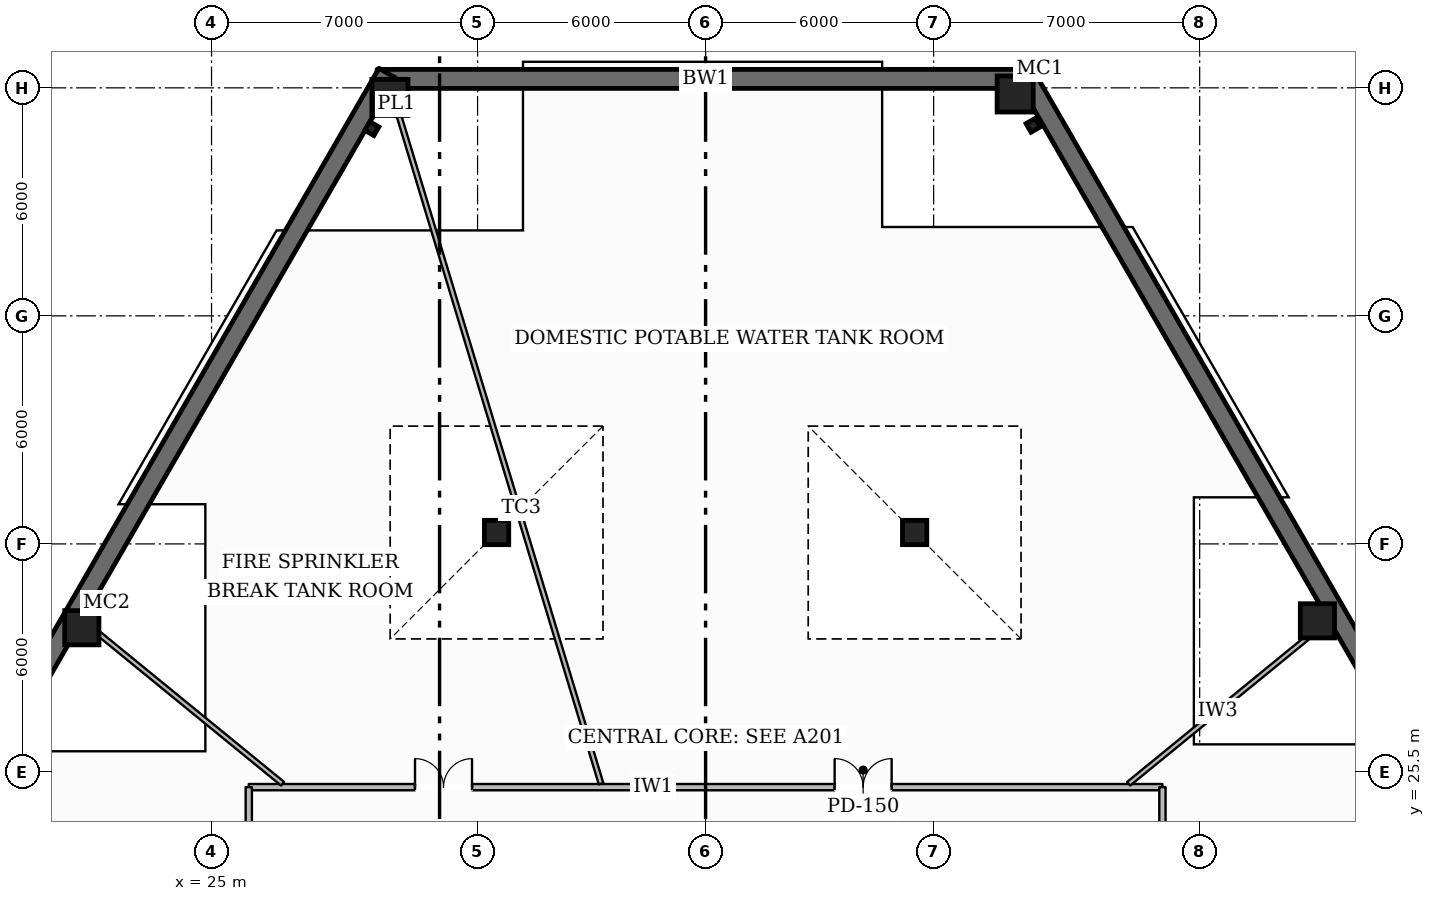
"""IFC4 building model, lengths in metres.
Left out: names, types, materials, properties, quantities, classifications, styles, units other than length and angle.
Written with IfcOpenShell. Run it as: python <this file> out.ifc"""

import sys

from ifc_helpers import new_model, si_unit, direction, frame, frame_2d, origin, origin_2d, place, context, subcontext, project, spatial, rectangle, hollow_rectangle, i_section, extrude, element, fill, save


model = new_model("IFC4")
c1 = context("Model", 3, precision=1e-05, world=origin(), true_north=direction((0.0, 1.0)))
c2 = subcontext(c1, "Body", "Model", "MODEL_VIEW")
j1 = project(units=[si_unit("LENGTHUNIT", "METRE"), si_unit("PLANEANGLEUNIT", "RADIAN")], contexts=[c1])
p1 = place(None, origin())
s1 = spatial("IfcSite", under=j1, at=p1, CompositionType="ELEMENT")
p2 = place(p1, origin())
s2 = spatial("IfcBuilding", under=s1, at=p2, CompositionType="ELEMENT")
p3 = place(p2, frame((0.0, 0.0, -8.4)))
s3 = spatial("IfcBuildingStorey", under=s2, at=p3, CompositionType="ELEMENT", Elevation=-8.4)
p4 = place(p3, frame((46.644, 43.736, 0.0), z_axis=(0.0, 0.0, 1.0), x_axis=(-1.0, 0.0, 0.0)))
e1 = element("IfcWall", 1, at=p4, inside=s3, PredefinedType="SHEAR", context=c2, shape_type="SweptSolid", body=[
    extrude(rectangle(XDim=17.289, YDim=0.5, at=frame_2d((8.644, 0.0))), origin(), (0.0, 0.0, 1.0), 3.95),
])
for number, where, z_axis, x_axis in (
    (2, (29.622, 43.889, 0.0), (0.0, 0.0, 1.0), (-0.5, -0.866, 0.0)),
    (3, (62.878, 15.311, 0.0), (0.0, 0.0, 1.0), (-0.5, 0.866, 0.0)),
):
    element("IfcWall", number, at=place(p3, frame(where, z_axis=z_axis, x_axis=x_axis)), inside=s3, PredefinedType="SHEAR", context=c2, shape_type="SweptSolid", body=[
        extrude(rectangle(XDim=33.0, YDim=0.5, at=frame_2d((16.5, 0.0))), origin(), (0.0, 0.0, 1.0), 3.95),
    ])
for number, where, z_axis, x_axis in (
    (4, (46.145, 43.339, 0.0), (0.0, 0.0, 1.0), (1.0, 0.0, 0.0)),
    (5, (29.695, 43.249, 0.0), (0.0, 0.0, 1.0), (1.0, 0.0, 0.0)),
):
    element("IfcColumn", number, at=place(p3, frame(where, z_axis=z_axis, x_axis=x_axis)), inside=s3, PredefinedType="COLUMN", context=c2, shape_type="SweptSolid", body=[
        extrude(hollow_rectangle(XDim=0.95, YDim=0.95, WallThickness=0.04, at=origin_2d()), origin(), (0.0, 0.0, 1.0), 3.95),
    ])
for number, where, z_axis, x_axis in (
    (6, (21.587, 29.294, 0.0), (0.0, 0.0, 1.0), (1.0, 0.0, 0.0)),
    (7, (54.098, 29.476, 0.0), (0.0, 0.0, 1.0), (1.0, 0.0, 0.0)),
):
    element("IfcColumn", number, at=place(p3, frame(where, z_axis=z_axis, x_axis=x_axis)), inside=s3, PredefinedType="COLUMN", context=c2, shape_type="SweptSolid", body=[
        extrude(hollow_rectangle(XDim=0.9, YDim=0.9, WallThickness=0.038, at=origin_2d()), origin(), (0.0, 0.0, 1.0), 3.95),
    ])
for number, where, z_axis, x_axis in (
    (8, (29.217, 42.427, 0.0), (0.0, 0.0, 1.0), (-0.502, -0.865, 0.0)),
    (9, (46.617, 42.515, 0.0), (0.0, 0.0, 1.0), (-0.498, 0.867, 0.0)),
):
    element("IfcColumn", number, at=place(p3, frame(where, z_axis=z_axis, x_axis=x_axis)), inside=s3, PredefinedType="PILASTER", context=c2, shape_type="SweptSolid", body=[
        extrude(i_section(OverallWidth=0.261, OverallDepth=0.276, WebThickness=0.015, FlangeThickness=0.025, at=origin_2d()), origin(), (0.0, 0.0, 1.0), 3.95),
    ])
for number, where, z_axis, x_axis in (
    (10, (32.5, 31.8, 0.0), (0.0, 0.0, 1.0), (1.0, 0.0, 0.0)),
    (11, (43.5, 31.8, 0.0), (0.0, 0.0, 1.0), (1.0, 0.0, 0.0)),
):
    element("IfcColumn", number, at=place(p3, frame(where, z_axis=z_axis, x_axis=x_axis)), inside=s3, PredefinedType="COLUMN", context=c2, shape_type="SweptSolid", body=[
        extrude(hollow_rectangle(XDim=0.64, YDim=0.64, WallThickness=0.028, at=origin_2d()), origin(), (0.0, 0.0, 1.0), 3.95),
    ])
p5 = place(p3, frame((25.98, 25.1, 0.0), z_axis=(0.0, 0.0, 1.0), x_axis=(1.0, 0.0, 0.0)))
e12 = element("IfcWall", 12, at=p5, inside=s3, PredefinedType="PARTITIONING", context=c2, shape_type="SweptSolid", body=[
    extrude(rectangle(XDim=24.04, YDim=0.165, at=frame_2d((12.02, 0.0))), origin(), (0.0, 0.0, 1.0), 3.95),
])
p6 = place(p5, frame((15.415, 0.0, 0.0)))
e13 = element("IfcOpeningElement", 13, at=p6, cuts=e12, PredefinedType="OPENING", context=c2, shape_type="SweptSolid", body=[
    extrude(rectangle(XDim=1.5, YDim=2.25, at=frame_2d((0.75, 1.125))), frame((0.0, 0.093, 0.0), z_axis=(0.0, -1.0, 0.0), x_axis=(1.0, 0.0, 0.0)), (0.0, 0.0, 1.0), 0.185),
])
p7 = place(p5, frame((4.374, 0.0, 0.0)))
e14 = element("IfcOpeningElement", 14, at=p7, cuts=e12, PredefinedType="OPENING", context=c2, shape_type="SweptSolid", body=[
    extrude(rectangle(XDim=1.5, YDim=2.25, at=frame_2d((0.75, 1.125))), frame((0.0, 0.093, 0.0), z_axis=(0.0, -1.0, 0.0), x_axis=(1.0, 0.0, 0.0)), (0.0, 0.0, 1.0), 0.185),
])
p8 = place(p3, frame((25.98, 7.1, 0.0), z_axis=(0.0, 0.0, 1.0), x_axis=(0.0, 1.0, 0.0)))
e15 = element("IfcWall", 15, at=p8, inside=s3, PredefinedType="PARTITIONING", context=c2, shape_type="SweptSolid", body=[
    extrude(rectangle(XDim=18.0, YDim=0.165, at=frame_2d((9.0, 0.0))), origin(), (0.0, 0.0, 1.0), 3.95),
])
p9 = place(p8, frame((8.25, 0.0, 0.0)))
e16 = element("IfcOpeningElement", 16, at=p9, cuts=e15, PredefinedType="OPENING", context=c2, shape_type="SweptSolid", body=[
    extrude(rectangle(XDim=1.5, YDim=2.25, at=frame_2d((0.75, 1.125))), frame((0.0, 0.093, 0.0), z_axis=(0.0, -1.0, 0.0), x_axis=(1.0, 0.0, 0.0)), (0.0, 0.0, 1.0), 0.185),
])
p10 = place(p3, frame((50.02, 7.1, 0.0), z_axis=(0.0, 0.0, 1.0), x_axis=(0.0, 1.0, 0.0)))
e17 = element("IfcWall", 17, at=p10, inside=s3, PredefinedType="PARTITIONING", context=c2, shape_type="SweptSolid", body=[
    extrude(rectangle(XDim=18.0, YDim=0.165, at=frame_2d((9.0, 0.0))), origin(), (0.0, 0.0, 1.0), 3.638),
])
p11 = place(p10, frame((8.25, 0.0, 0.0)))
e18 = element("IfcOpeningElement", 18, at=p11, cuts=e17, PredefinedType="OPENING", context=c2, shape_type="SweptSolid", body=[
    extrude(rectangle(XDim=1.5, YDim=2.25, at=frame_2d((0.75, 1.125))), frame((0.0, 0.093, 0.0), z_axis=(0.0, -1.0, 0.0), x_axis=(1.0, 0.0, 0.0)), (0.0, 0.0, 1.0), 0.185),
])
p12 = place(p3, frame((49.132, 25.19, 0.0), z_axis=(0.0, 0.0, 1.0), x_axis=(0.774559140632, 0.632501492222, 0.0)))
e19 = element("IfcWall", 19, at=p12, inside=s3, PredefinedType="PARTITIONING", context=c2, shape_type="SweptSolid", body=[
    extrude(rectangle(XDim=6.051, YDim=0.125, at=frame_2d((3.026, 0.0))), origin(), (0.0, 0.0, 1.0), 3.417),
])
p13 = place(p3, frame((35.249, 25.19, 0.0), z_axis=(0.0, 0.0, 1.0), x_axis=(-0.289619538285, 0.957141851057, 0.0)))
e20 = element("IfcWall", 20, at=p13, inside=s3, PredefinedType="PARTITIONING", context=c2, shape_type="SweptSolid", body=[
    extrude(rectangle(XDim=18.362, YDim=0.125, at=frame_2d((9.181, 0.0))), origin(), (0.0, 0.0, 1.0), 3.95),
])
p14 = place(p3, frame((26.868, 25.19, 0.0), z_axis=(0.0, 0.0, 1.0), x_axis=(-0.774552615405, 0.632509482908, 0.0)))
e21 = element("IfcWall", 21, at=p14, inside=s3, PredefinedType="PARTITIONING", context=c2, shape_type="SweptSolid", body=[
    extrude(rectangle(XDim=6.227, YDim=0.125, at=frame_2d((3.114, 0.0))), origin(), (0.0, 0.0, 1.0), 3.95),
])
p15 = place(p6, origin())
e22 = element("IfcDoor", 22, at=p15, inside=s3, OperationType="DOUBLE_DOOR_SINGLE_SWING", PredefinedType="DOOR", context=c2, shape_type="SweptSolid", body=[
    extrude(rectangle(XDim=1.5, YDim=2.25, at=frame_2d((0.75, 1.125))), frame((0.0, 0.025, 0.0), z_axis=(0.0, -1.0, 0.0), x_axis=(1.0, 0.0, 0.0)), (0.0, 0.0, 1.0), 0.05),
])
fill(e13, e22)
p16 = place(p7, origin())
e23 = element("IfcDoor", 23, at=p16, inside=s3, OperationType="DOUBLE_DOOR_SINGLE_SWING", PredefinedType="DOOR", context=c2, shape_type="SweptSolid", body=[
    extrude(rectangle(XDim=1.5, YDim=2.25, at=frame_2d((0.75, 1.125))), frame((0.0, 0.025, 0.0), z_axis=(0.0, -1.0, 0.0), x_axis=(1.0, 0.0, 0.0)), (0.0, 0.0, 1.0), 0.05),
])
fill(e14, e23)
save(model, sys.argv[1])
